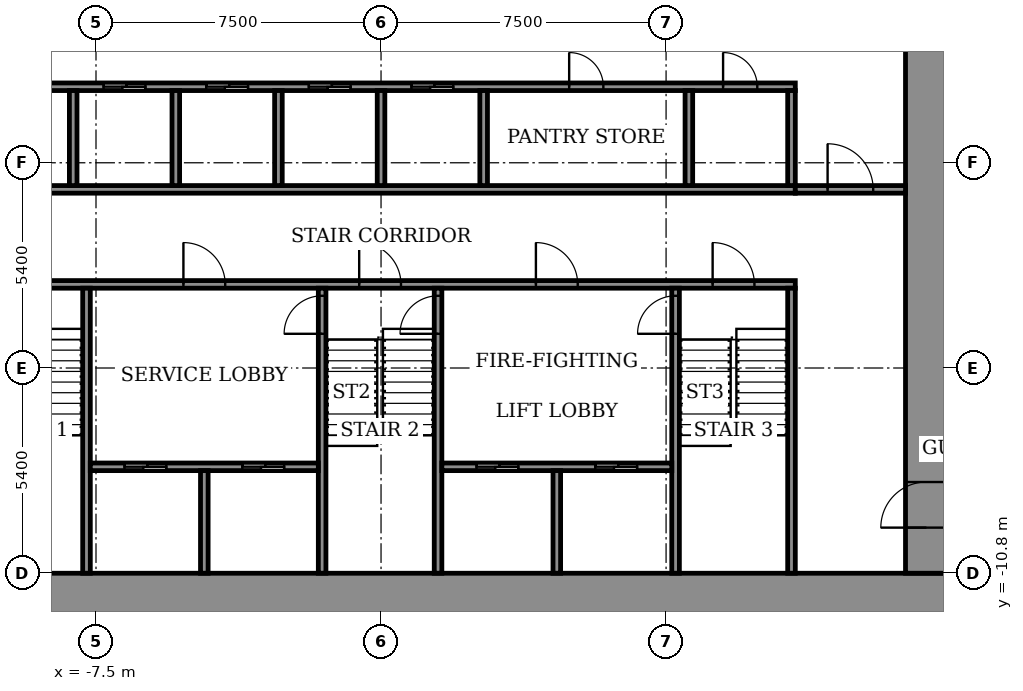
"""IFC4 building model, lengths in metres.
Left out: names, types, materials, properties, quantities, classifications, styles, units other than length and angle.
Written with IfcOpenShell. Run it as: python <this file> out.ifc"""

import sys

from ifc_helpers import new_model, si_unit, direction, frame, frame_2d, origin, place, context, subcontext, project, spatial, rectangle, extrude, element, fill, save


model = new_model("IFC4")
c1 = context("Model", 3, precision=1e-05, world=origin(), true_north=direction((0.0, 1.0)))
c2 = subcontext(c1, "Body", "Model", "MODEL_VIEW")
j1 = project(units=[si_unit("LENGTHUNIT", "METRE"), si_unit("PLANEANGLEUNIT", "RADIAN")], contexts=[c1])
p1 = place(None, origin())
s1 = spatial("IfcSite", under=j1, at=p1, CompositionType="ELEMENT")
p2 = place(p1, origin())
s2 = spatial("IfcBuilding", under=s1, at=p2, CompositionType="ELEMENT")
p3 = place(p2, frame((0.0, 0.0, 41.3)))
s3 = spatial("IfcBuildingStorey", under=s2, at=p3, CompositionType="ELEMENT", Elevation=41.3)
p4 = place(p3, frame((-14.9, -11.35, 0.0), z_axis=(0.0, 0.0, 1.0), x_axis=(1.0, 0.0, 0.0)))
e1 = element("IfcWall", 1, at=p4, inside=s3, PredefinedType="SHEAR", context=c2, shape_type="SweptSolid", body=[
    extrude(rectangle(XDim=29.8, YDim=1.1, at=frame_2d((14.9, 0.0))), origin(), (0.0, 0.0, 1.0), 3.6),
])
p5 = place(p3, frame((14.35, -10.8, 0.0), z_axis=(0.0, 0.0, 1.0), x_axis=(0.0, 1.0, 0.0)))
e2 = element("IfcWall", 2, at=p5, inside=s3, PredefinedType="SHEAR", context=c2, shape_type="SweptSolid", body=[
    extrude(rectangle(XDim=21.6, YDim=1.1, at=frame_2d((10.8, 0.0))), origin(), (0.0, 0.0, 1.0), 3.6),
])
p6 = place(p5, frame((1.2, 0.0, 0.0)))
e3 = element("IfcOpeningElement", 3, at=p6, cuts=e2, PredefinedType="OPENING", context=c2, shape_type="SweptSolid", body=[
    extrude(rectangle(XDim=1.2, YDim=2.1, at=frame_2d((0.6, 1.05))), frame((0.0, 0.56, 0.0), z_axis=(0.0, -1.0, 0.0), x_axis=(1.0, 0.0, 0.0)), (0.0, 0.0, 1.0), 1.12),
])
p7 = place(p3, frame((-10.9, -3.2, 0.0), z_axis=(0.0, 0.0, 1.0), x_axis=(1.0, 0.0, 0.0)))
e4 = element("IfcWall", 4, at=p7, inside=s3, PredefinedType="SHEAR", context=c2, shape_type="SweptSolid", body=[
    extrude(rectangle(XDim=21.8, YDim=0.2, at=frame_2d((10.9, 0.0))), origin(), (0.0, 0.0, 1.0), 3.05),
])
p8 = place(p7, frame((1.075, 0.0, 0.0)))
e5 = element("IfcOpeningElement", 5, at=p8, cuts=e4, PredefinedType="OPENING", context=c2, shape_type="SweptSolid", body=[
    extrude(rectangle(XDim=1.1, YDim=2.1, at=frame_2d((0.55, 1.05))), frame((0.0, 0.11, 0.0), z_axis=(0.0, -1.0, 0.0), x_axis=(1.0, 0.0, 0.0)), (0.0, 0.0, 1.0), 0.22),
])
p9 = place(p7, frame((10.325, 0.0, 0.0)))
e6 = element("IfcOpeningElement", 6, at=p9, cuts=e4, PredefinedType="OPENING", context=c2, shape_type="SweptSolid", body=[
    extrude(rectangle(XDim=1.1, YDim=2.1, at=frame_2d((0.55, 1.05))), frame((0.0, 0.11, 0.0), z_axis=(0.0, -1.0, 0.0), x_axis=(1.0, 0.0, 0.0)), (0.0, 0.0, 1.0), 0.22),
])
p10 = place(p7, frame((19.625, 0.0, 0.0)))
e7 = element("IfcOpeningElement", 7, at=p10, cuts=e4, PredefinedType="OPENING", context=c2, shape_type="SweptSolid", body=[
    extrude(rectangle(XDim=1.1, YDim=2.1, at=frame_2d((0.55, 1.05))), frame((0.0, 0.11, 0.0), z_axis=(0.0, -1.0, 0.0), x_axis=(1.0, 0.0, 0.0)), (0.0, 0.0, 1.0), 0.22),
])
p11 = place(p7, frame((5.7, 0.0, 0.0)))
e8 = element("IfcOpeningElement", 8, at=p11, cuts=e4, PredefinedType="OPENING", context=c2, shape_type="SweptSolid", body=[
    extrude(rectangle(XDim=1.1, YDim=2.1, at=frame_2d((0.55, 1.05))), frame((0.0, 0.11, 0.0), z_axis=(0.0, -1.0, 0.0), x_axis=(1.0, 0.0, 0.0)), (0.0, 0.0, 1.0), 0.22),
])
p12 = place(p7, frame((14.975, 0.0, 0.0)))
e9 = element("IfcOpeningElement", 9, at=p12, cuts=e4, PredefinedType="OPENING", context=c2, shape_type="SweptSolid", body=[
    extrude(rectangle(XDim=1.1, YDim=2.1, at=frame_2d((0.55, 1.05))), frame((0.0, 0.11, 0.0), z_axis=(0.0, -1.0, 0.0), x_axis=(1.0, 0.0, 0.0)), (0.0, 0.0, 1.0), 0.22),
])
p13 = place(p3, frame((-10.9, -0.7, 0.0), z_axis=(0.0, 0.0, 1.0), x_axis=(1.0, 0.0, 0.0)))
e10 = element("IfcWall", 10, at=p13, inside=s3, PredefinedType="SHEAR", context=c2, shape_type="SweptSolid", body=[
    extrude(rectangle(XDim=21.8, YDim=0.2, at=frame_2d((10.9, 0.0))), origin(), (0.0, 0.0, 1.0), 3.05),
])
p14 = place(p3, frame((-10.9, 2.0, 0.0), z_axis=(0.0, 0.0, 1.0), x_axis=(1.0, 0.0, 0.0)))
e11 = element("IfcWall", 11, at=p14, inside=s3, PredefinedType="SHEAR", context=c2, shape_type="SweptSolid", body=[
    extrude(rectangle(XDim=21.8, YDim=0.2, at=frame_2d((10.9, 0.0))), origin(), (0.0, 0.0, 1.0), 3.05),
])
p15 = place(p14, frame((0.9, 0.0, 0.0)))
e12 = element("IfcOpeningElement", 12, at=p15, cuts=e11, PredefinedType="OPENING", context=c2, shape_type="SweptSolid", body=[
    extrude(rectangle(XDim=1.1, YDim=2.1, at=frame_2d((0.55, 1.05))), frame((0.0, 0.11, 0.0), z_axis=(0.0, -1.0, 0.0), x_axis=(1.0, 0.0, 0.0)), (0.0, 0.0, 1.0), 0.22),
])
p16 = place(p14, frame((3.6, 0.0, 0.0)))
e13 = element("IfcOpeningElement", 13, at=p16, cuts=e11, PredefinedType="OPENING", context=c2, shape_type="SweptSolid", body=[
    extrude(rectangle(XDim=1.1, YDim=2.1, at=frame_2d((0.55, 1.05))), frame((0.0, 0.11, 0.0), z_axis=(0.0, -1.0, 0.0), x_axis=(1.0, 0.0, 0.0)), (0.0, 0.0, 1.0), 0.22),
])
p17 = place(p14, frame((6.3, 0.0, 0.0)))
e14 = element("IfcOpeningElement", 14, at=p17, cuts=e11, PredefinedType="OPENING", context=c2, shape_type="SweptSolid", body=[
    extrude(rectangle(XDim=1.1, YDim=2.1, at=frame_2d((0.55, 1.05))), frame((0.0, 0.11, 0.0), z_axis=(0.0, -1.0, 0.0), x_axis=(1.0, 0.0, 0.0)), (0.0, 0.0, 1.0), 0.22),
])
p18 = place(p14, frame((9.0, 0.0, 0.0)))
e15 = element("IfcOpeningElement", 15, at=p18, cuts=e11, PredefinedType="OPENING", context=c2, shape_type="SweptSolid", body=[
    extrude(rectangle(XDim=1.1, YDim=2.1, at=frame_2d((0.55, 1.05))), frame((0.0, 0.11, 0.0), z_axis=(0.0, -1.0, 0.0), x_axis=(1.0, 0.0, 0.0)), (0.0, 0.0, 1.0), 0.22),
])
p19 = place(p14, frame((11.7, 0.0, 0.0)))
e16 = element("IfcOpeningElement", 16, at=p19, cuts=e11, PredefinedType="OPENING", context=c2, shape_type="SweptSolid", body=[
    extrude(rectangle(XDim=1.1, YDim=2.1, at=frame_2d((0.55, 1.05))), frame((0.0, 0.11, 0.0), z_axis=(0.0, -1.0, 0.0), x_axis=(1.0, 0.0, 0.0)), (0.0, 0.0, 1.0), 0.22),
])
p20 = place(p14, frame((15.85, 0.0, 0.0)))
e17 = element("IfcOpeningElement", 17, at=p20, cuts=e11, PredefinedType="OPENING", context=c2, shape_type="SweptSolid", body=[
    extrude(rectangle(XDim=0.9, YDim=2.1, at=frame_2d((0.45, 1.05))), frame((0.0, 0.11, 0.0), z_axis=(0.0, -1.0, 0.0), x_axis=(1.0, 0.0, 0.0)), (0.0, 0.0, 1.0), 0.22),
])
p21 = place(p14, frame((19.9, 0.0, 0.0)))
e18 = element("IfcOpeningElement", 18, at=p21, cuts=e11, PredefinedType="OPENING", context=c2, shape_type="SweptSolid", body=[
    extrude(rectangle(XDim=0.9, YDim=2.1, at=frame_2d((0.45, 1.05))), frame((0.0, 0.11, 0.0), z_axis=(0.0, -1.0, 0.0), x_axis=(1.0, 0.0, 0.0)), (0.0, 0.0, 1.0), 0.22),
])
p22 = place(p3, frame((-7.75, -10.8, 0.0), z_axis=(0.0, 0.0, 1.0), x_axis=(0.0, 1.0, 0.0)))
e19 = element("IfcWall", 19, at=p22, inside=s3, PredefinedType="SHEAR", context=c2, shape_type="SweptSolid", body=[
    extrude(rectangle(XDim=7.5, YDim=0.2, at=frame_2d((3.75, 0.0))), origin(), (0.0, 0.0, 1.0), 3.05),
])
p23 = place(p3, frame((-1.55, -10.8, 0.0), z_axis=(0.0, 0.0, 1.0), x_axis=(0.0, 1.0, 0.0)))
e20 = element("IfcWall", 20, at=p23, inside=s3, PredefinedType="SHEAR", context=c2, shape_type="SweptSolid", body=[
    extrude(rectangle(XDim=7.5, YDim=0.2, at=frame_2d((3.75, 0.0))), origin(), (0.0, 0.0, 1.0), 3.05),
])
p24 = place(p23, frame((6.3, 0.0, 0.0)))
e21 = element("IfcOpeningElement", 21, at=p24, cuts=e20, PredefinedType="OPENING", context=c2, shape_type="SweptSolid", body=[
    extrude(rectangle(XDim=1.0, YDim=2.1, at=frame_2d((0.5, 1.05))), frame((0.0, 0.11, 0.0), z_axis=(0.0, -1.0, 0.0), x_axis=(1.0, 0.0, 0.0)), (0.0, 0.0, 1.0), 0.22),
])
p25 = place(p3, frame((1.5, -10.8, 0.0), z_axis=(0.0, 0.0, 1.0), x_axis=(0.0, 1.0, 0.0)))
e22 = element("IfcWall", 22, at=p25, inside=s3, PredefinedType="SHEAR", context=c2, shape_type="SweptSolid", body=[
    extrude(rectangle(XDim=7.5, YDim=0.2, at=frame_2d((3.75, 0.0))), origin(), (0.0, 0.0, 1.0), 3.05),
])
p26 = place(p25, frame((6.3, 0.0, 0.0)))
e23 = element("IfcOpeningElement", 23, at=p26, cuts=e22, PredefinedType="OPENING", context=c2, shape_type="SweptSolid", body=[
    extrude(rectangle(XDim=1.0, YDim=2.1, at=frame_2d((0.5, 1.05))), frame((0.0, 0.11, 0.0), z_axis=(0.0, -1.0, 0.0), x_axis=(1.0, 0.0, 0.0)), (0.0, 0.0, 1.0), 0.22),
])
p27 = place(p3, frame((7.75, -10.8, 0.0), z_axis=(0.0, 0.0, 1.0), x_axis=(0.0, 1.0, 0.0)))
e24 = element("IfcWall", 24, at=p27, inside=s3, PredefinedType="SHEAR", context=c2, shape_type="SweptSolid", body=[
    extrude(rectangle(XDim=7.5, YDim=0.2, at=frame_2d((3.75, 0.0))), origin(), (0.0, 0.0, 1.0), 3.05),
])
p28 = place(p27, frame((6.3, 0.0, 0.0)))
e25 = element("IfcOpeningElement", 25, at=p28, cuts=e24, PredefinedType="OPENING", context=c2, shape_type="SweptSolid", body=[
    extrude(rectangle(XDim=1.0, YDim=2.1, at=frame_2d((0.5, 1.05))), frame((0.0, 0.11, 0.0), z_axis=(0.0, -1.0, 0.0), x_axis=(1.0, 0.0, 0.0)), (0.0, 0.0, 1.0), 0.22),
])
p29 = place(p3, frame((10.8, -10.8, 0.0), z_axis=(0.0, 0.0, 1.0), x_axis=(0.0, 1.0, 0.0)))
e26 = element("IfcWall", 26, at=p29, inside=s3, PredefinedType="SHEAR", context=c2, shape_type="SweptSolid", body=[
    extrude(rectangle(XDim=7.5, YDim=0.2, at=frame_2d((3.75, 0.0))), origin(), (0.0, 0.0, 1.0), 3.05),
])
p30 = place(p3, frame((-7.65, -8.0, 0.0), z_axis=(0.0, 0.0, 1.0), x_axis=(1.0, 0.0, 0.0)))
e27 = element("IfcWall", 27, at=p30, inside=s3, PredefinedType="SHEAR", context=c2, shape_type="SweptSolid", body=[
    extrude(rectangle(XDim=6.0, YDim=0.2, at=frame_2d((3.0, 0.0))), origin(), (0.0, 0.0, 1.0), 3.05),
])
p31 = place(p30, frame((0.9, 0.0, 0.0)))
e28 = element("IfcOpeningElement", 28, at=p31, cuts=e27, PredefinedType="OPENING", context=c2, shape_type="SweptSolid", body=[
    extrude(rectangle(XDim=1.1, YDim=2.1, at=frame_2d((0.55, 1.05))), frame((0.0, 0.11, 0.0), z_axis=(0.0, -1.0, 0.0), x_axis=(1.0, 0.0, 0.0)), (0.0, 0.0, 1.0), 0.22),
])
p32 = place(p30, frame((4.0, 0.0, 0.0)))
e29 = element("IfcOpeningElement", 29, at=p32, cuts=e27, PredefinedType="OPENING", context=c2, shape_type="SweptSolid", body=[
    extrude(rectangle(XDim=1.1, YDim=2.1, at=frame_2d((0.55, 1.05))), frame((0.0, 0.11, 0.0), z_axis=(0.0, -1.0, 0.0), x_axis=(1.0, 0.0, 0.0)), (0.0, 0.0, 1.0), 0.22),
])
p33 = place(p3, frame((-4.65, -10.8, 0.0), z_axis=(0.0, 0.0, 1.0), x_axis=(0.0, 1.0, 0.0)))
e30 = element("IfcWall", 30, at=p33, inside=s3, PredefinedType="SHEAR", context=c2, shape_type="SweptSolid", body=[
    extrude(rectangle(XDim=2.7, YDim=0.2, at=frame_2d((1.35, 0.0))), origin(), (0.0, 0.0, 1.0), 3.05),
])
p34 = place(p3, frame((1.6, -8.0, 0.0), z_axis=(0.0, 0.0, 1.0), x_axis=(1.0, 0.0, 0.0)))
e31 = element("IfcWall", 31, at=p34, inside=s3, PredefinedType="SHEAR", context=c2, shape_type="SweptSolid", body=[
    extrude(rectangle(XDim=6.05, YDim=0.2, at=frame_2d((3.025, 0.0))), origin(), (0.0, 0.0, 1.0), 3.05),
])
p35 = place(p34, frame((0.913, 0.0, 0.0)))
e32 = element("IfcOpeningElement", 32, at=p35, cuts=e31, PredefinedType="OPENING", context=c2, shape_type="SweptSolid", body=[
    extrude(rectangle(XDim=1.1, YDim=2.1, at=frame_2d((0.55, 1.05))), frame((0.0, 0.11, 0.0), z_axis=(0.0, -1.0, 0.0), x_axis=(1.0, 0.0, 0.0)), (0.0, 0.0, 1.0), 0.22),
])
p36 = place(p34, frame((4.038, 0.0, 0.0)))
e33 = element("IfcOpeningElement", 33, at=p36, cuts=e31, PredefinedType="OPENING", context=c2, shape_type="SweptSolid", body=[
    extrude(rectangle(XDim=1.1, YDim=2.1, at=frame_2d((0.55, 1.05))), frame((0.0, 0.11, 0.0), z_axis=(0.0, -1.0, 0.0), x_axis=(1.0, 0.0, 0.0)), (0.0, 0.0, 1.0), 0.22),
])
p37 = place(p3, frame((4.625, -10.8, 0.0), z_axis=(0.0, 0.0, 1.0), x_axis=(0.0, 1.0, 0.0)))
e34 = element("IfcWall", 34, at=p37, inside=s3, PredefinedType="SHEAR", context=c2, shape_type="SweptSolid", body=[
    extrude(rectangle(XDim=2.7, YDim=0.2, at=frame_2d((1.35, 0.0))), origin(), (0.0, 0.0, 1.0), 3.05),
])
for number, where, z_axis, x_axis in (
    (35, (-8.1, -0.6, 0.0), (0.0, 0.0, 1.0), (0.0, 1.0, 0.0)),
    (36, (-5.4, -0.6, 0.0), (0.0, 0.0, 1.0), (0.0, 1.0, 0.0)),
    (37, (-2.7, -0.6, 0.0), (0.0, 0.0, 1.0), (0.0, 1.0, 0.0)),
    (38, (0.0, -0.6, 0.0), (0.0, 0.0, 1.0), (0.0, 1.0, 0.0)),
    (39, (2.7, -0.6, 0.0), (0.0, 0.0, 1.0), (0.0, 1.0, 0.0)),
):
    element("IfcWall", number, at=place(p3, frame(where, z_axis=z_axis, x_axis=x_axis)), inside=s3, PredefinedType="SHEAR", context=c2, shape_type="SweptSolid", body=[
        extrude(rectangle(XDim=2.5, YDim=0.2, at=frame_2d((1.25, 0.0))), origin(), (0.0, 0.0, 1.0), 3.05),
    ])
for number, where, z_axis, x_axis in (
    (40, (8.1, -0.6, 0.0), (0.0, 0.0, 1.0), (0.0, 1.0, 0.0)),
    (41, (10.8, -0.6, 0.0), (0.0, 0.0, 1.0), (0.0, 1.0, 0.0)),
):
    element("IfcWall", number, at=place(p3, frame(where, z_axis=z_axis, x_axis=x_axis)), inside=s3, PredefinedType="STANDARD", context=c2, shape_type="SweptSolid", body=[
        extrude(rectangle(XDim=2.5, YDim=0.2, at=frame_2d((1.25, 0.0))), origin(), (0.0, 0.0, 1.0), 3.05),
    ])
p38 = place(p3, frame((10.9, -0.7, 0.0), z_axis=(0.0, 0.0, 1.0), x_axis=(1.0, 0.0, 0.0)))
e42 = element("IfcWall", 42, at=p38, inside=s3, PredefinedType="STANDARD", context=c2, shape_type="SweptSolid", body=[
    extrude(rectangle(XDim=2.9, YDim=0.2, at=frame_2d((1.45, 0.0))), origin(), (0.0, 0.0, 1.0), 3.05),
])
p39 = place(p38, frame((0.85, 0.0, 0.0)))
e43 = element("IfcOpeningElement", 43, at=p39, cuts=e42, PredefinedType="OPENING", context=c2, shape_type="SweptSolid", body=[
    extrude(rectangle(XDim=1.2, YDim=2.1, at=frame_2d((0.6, 1.05))), frame((0.0, 0.11, 0.0), z_axis=(0.0, -1.0, 0.0), x_axis=(1.0, 0.0, 0.0)), (0.0, 0.0, 1.0), 0.22),
])
p40 = place(p6, origin())
e44 = element("IfcDoor", 44, at=p40, inside=s3, OperationType="DOUBLE_DOOR_SINGLE_SWING", PredefinedType="DOOR", context=c2, shape_type="SweptSolid", body=[
    extrude(rectangle(XDim=1.2, YDim=2.1, at=frame_2d((0.6, 1.05))), frame((0.0, 0.025, 0.0), z_axis=(0.0, -1.0, 0.0), x_axis=(1.0, 0.0, 0.0)), (0.0, 0.0, 1.0), 0.05),
])
fill(e3, e44)
p41 = place(p16, origin())
e45 = element("IfcDoor", 45, at=p41, inside=s3, OperationType="SLIDING_TO_LEFT", PredefinedType="DOOR", context=c2, shape_type="SweptSolid", body=[
    extrude(rectangle(XDim=1.1, YDim=2.1, at=frame_2d((0.55, 1.05))), frame((0.0, 0.025, 0.0), z_axis=(0.0, -1.0, 0.0), x_axis=(1.0, 0.0, 0.0)), (0.0, 0.0, 1.0), 0.05),
])
fill(e13, e45)
p42 = place(p17, origin())
e46 = element("IfcDoor", 46, at=p42, inside=s3, OperationType="SLIDING_TO_LEFT", PredefinedType="DOOR", context=c2, shape_type="SweptSolid", body=[
    extrude(rectangle(XDim=1.1, YDim=2.1, at=frame_2d((0.55, 1.05))), frame((0.0, 0.025, 0.0), z_axis=(0.0, -1.0, 0.0), x_axis=(1.0, 0.0, 0.0)), (0.0, 0.0, 1.0), 0.05),
])
fill(e14, e46)
p43 = place(p18, origin())
e47 = element("IfcDoor", 47, at=p43, inside=s3, OperationType="SLIDING_TO_LEFT", PredefinedType="DOOR", context=c2, shape_type="SweptSolid", body=[
    extrude(rectangle(XDim=1.1, YDim=2.1, at=frame_2d((0.55, 1.05))), frame((0.0, 0.025, 0.0), z_axis=(0.0, -1.0, 0.0), x_axis=(1.0, 0.0, 0.0)), (0.0, 0.0, 1.0), 0.05),
])
fill(e15, e47)
p44 = place(p19, origin())
e48 = element("IfcDoor", 48, at=p44, inside=s3, OperationType="SLIDING_TO_LEFT", PredefinedType="DOOR", context=c2, shape_type="SweptSolid", body=[
    extrude(rectangle(XDim=1.1, YDim=2.1, at=frame_2d((0.55, 1.05))), frame((0.0, 0.025, 0.0), z_axis=(0.0, -1.0, 0.0), x_axis=(1.0, 0.0, 0.0)), (0.0, 0.0, 1.0), 0.05),
])
fill(e16, e48)
p45 = place(p20, origin())
e49 = element("IfcDoor", 49, at=p45, inside=s3, OperationType="SINGLE_SWING_RIGHT", PredefinedType="DOOR", context=c2, shape_type="SweptSolid", body=[
    extrude(rectangle(XDim=0.9, YDim=2.1, at=frame_2d((0.45, 1.05))), frame((0.0, 0.025, 0.0), z_axis=(0.0, -1.0, 0.0), x_axis=(1.0, 0.0, 0.0)), (0.0, 0.0, 1.0), 0.05),
])
fill(e17, e49)
p46 = place(p21, origin())
e50 = element("IfcDoor", 50, at=p46, inside=s3, OperationType="SINGLE_SWING_RIGHT", PredefinedType="DOOR", context=c2, shape_type="SweptSolid", body=[
    extrude(rectangle(XDim=0.9, YDim=2.1, at=frame_2d((0.45, 1.05))), frame((0.0, 0.025, 0.0), z_axis=(0.0, -1.0, 0.0), x_axis=(1.0, 0.0, 0.0)), (0.0, 0.0, 1.0), 0.05),
])
fill(e18, e50)
p47 = place(p35, origin())
e51 = element("IfcDoor", 51, at=p47, inside=s3, OperationType="SLIDING_TO_LEFT", PredefinedType="DOOR", context=c2, shape_type="SweptSolid", body=[
    extrude(rectangle(XDim=1.1, YDim=2.1, at=frame_2d((0.55, 1.05))), frame((0.0, 0.025, 0.0), z_axis=(0.0, -1.0, 0.0), x_axis=(1.0, 0.0, 0.0)), (0.0, 0.0, 1.0), 0.05),
])
fill(e32, e51)
p48 = place(p31, origin())
e52 = element("IfcDoor", 52, at=p48, inside=s3, OperationType="SLIDING_TO_LEFT", PredefinedType="DOOR", context=c2, shape_type="SweptSolid", body=[
    extrude(rectangle(XDim=1.1, YDim=2.1, at=frame_2d((0.55, 1.05))), frame((0.0, 0.025, 0.0), z_axis=(0.0, -1.0, 0.0), x_axis=(1.0, 0.0, 0.0)), (0.0, 0.0, 1.0), 0.05),
])
fill(e28, e52)
p49 = place(p36, origin())
e53 = element("IfcDoor", 53, at=p49, inside=s3, OperationType="SLIDING_TO_LEFT", PredefinedType="DOOR", context=c2, shape_type="SweptSolid", body=[
    extrude(rectangle(XDim=1.1, YDim=2.1, at=frame_2d((0.55, 1.05))), frame((0.0, 0.025, 0.0), z_axis=(0.0, -1.0, 0.0), x_axis=(1.0, 0.0, 0.0)), (0.0, 0.0, 1.0), 0.05),
])
fill(e33, e53)
p50 = place(p32, origin())
e54 = element("IfcDoor", 54, at=p50, inside=s3, OperationType="SLIDING_TO_LEFT", PredefinedType="DOOR", context=c2, shape_type="SweptSolid", body=[
    extrude(rectangle(XDim=1.1, YDim=2.1, at=frame_2d((0.55, 1.05))), frame((0.0, 0.025, 0.0), z_axis=(0.0, -1.0, 0.0), x_axis=(1.0, 0.0, 0.0)), (0.0, 0.0, 1.0), 0.05),
])
fill(e29, e54)
p51 = place(p9, origin())
e55 = element("IfcDoor", 55, at=p51, inside=s3, OperationType="SINGLE_SWING_RIGHT", PredefinedType="DOOR", context=c2, shape_type="SweptSolid", body=[
    extrude(rectangle(XDim=1.1, YDim=2.1, at=frame_2d((0.55, 1.05))), frame((0.0, 0.025, 0.0), z_axis=(0.0, -1.0, 0.0), x_axis=(1.0, 0.0, 0.0)), (0.0, 0.0, 1.0), 0.05),
])
fill(e6, e55)
p52 = place(p10, origin())
e56 = element("IfcDoor", 56, at=p52, inside=s3, OperationType="SINGLE_SWING_RIGHT", PredefinedType="DOOR", context=c2, shape_type="SweptSolid", body=[
    extrude(rectangle(XDim=1.1, YDim=2.1, at=frame_2d((0.55, 1.05))), frame((0.0, 0.025, 0.0), z_axis=(0.0, -1.0, 0.0), x_axis=(1.0, 0.0, 0.0)), (0.0, 0.0, 1.0), 0.05),
])
fill(e7, e56)
p53 = place(p11, origin())
e57 = element("IfcDoor", 57, at=p53, inside=s3, OperationType="SINGLE_SWING_LEFT", PredefinedType="DOOR", context=c2, shape_type="SweptSolid", body=[
    extrude(rectangle(XDim=1.1, YDim=2.1, at=frame_2d((0.55, 1.05))), frame((0.0, 0.025, 0.0), z_axis=(0.0, -1.0, 0.0), x_axis=(1.0, 0.0, 0.0)), (0.0, 0.0, 1.0), 0.05),
])
fill(e8, e57)
p54 = place(p12, origin())
e58 = element("IfcDoor", 58, at=p54, inside=s3, OperationType="SINGLE_SWING_LEFT", PredefinedType="DOOR", context=c2, shape_type="SweptSolid", body=[
    extrude(rectangle(XDim=1.1, YDim=2.1, at=frame_2d((0.55, 1.05))), frame((0.0, 0.025, 0.0), z_axis=(0.0, -1.0, 0.0), x_axis=(1.0, 0.0, 0.0)), (0.0, 0.0, 1.0), 0.05),
])
fill(e9, e58)
p55 = place(p24, origin())
e59 = element("IfcDoor", 59, at=p55, inside=s3, OperationType="SINGLE_SWING_RIGHT", PredefinedType="DOOR", context=c2, shape_type="SweptSolid", body=[
    extrude(rectangle(XDim=1.0, YDim=2.1, at=frame_2d((0.5, 1.05))), frame((0.0, 0.025, 0.0), z_axis=(0.0, -1.0, 0.0), x_axis=(1.0, 0.0, 0.0)), (0.0, 0.0, 1.0), 0.05),
])
fill(e21, e59)
p56 = place(p26, origin())
e60 = element("IfcDoor", 60, at=p56, inside=s3, OperationType="SINGLE_SWING_RIGHT", PredefinedType="DOOR", context=c2, shape_type="SweptSolid", body=[
    extrude(rectangle(XDim=1.0, YDim=2.1, at=frame_2d((0.5, 1.05))), frame((0.0, 0.025, 0.0), z_axis=(0.0, -1.0, 0.0), x_axis=(1.0, 0.0, 0.0)), (0.0, 0.0, 1.0), 0.05),
])
fill(e23, e60)
p57 = place(p28, origin())
e61 = element("IfcDoor", 61, at=p57, inside=s3, OperationType="SINGLE_SWING_RIGHT", PredefinedType="DOOR", context=c2, shape_type="SweptSolid", body=[
    extrude(rectangle(XDim=1.0, YDim=2.1, at=frame_2d((0.5, 1.05))), frame((0.0, 0.025, 0.0), z_axis=(0.0, -1.0, 0.0), x_axis=(1.0, 0.0, 0.0)), (0.0, 0.0, 1.0), 0.05),
])
fill(e25, e61)
p58 = place(p39, origin())
e62 = element("IfcDoor", 62, at=p58, inside=s3, OperationType="SINGLE_SWING_LEFT", PredefinedType="DOOR", context=c2, shape_type="SweptSolid", body=[
    extrude(rectangle(XDim=1.2, YDim=2.1, at=frame_2d((0.6, 1.05))), frame((0.0, 0.025, 0.0), z_axis=(0.0, -1.0, 0.0), x_axis=(1.0, 0.0, 0.0)), (0.0, 0.0, 1.0), 0.05),
])
fill(e43, e62)
save(model, sys.argv[1])
